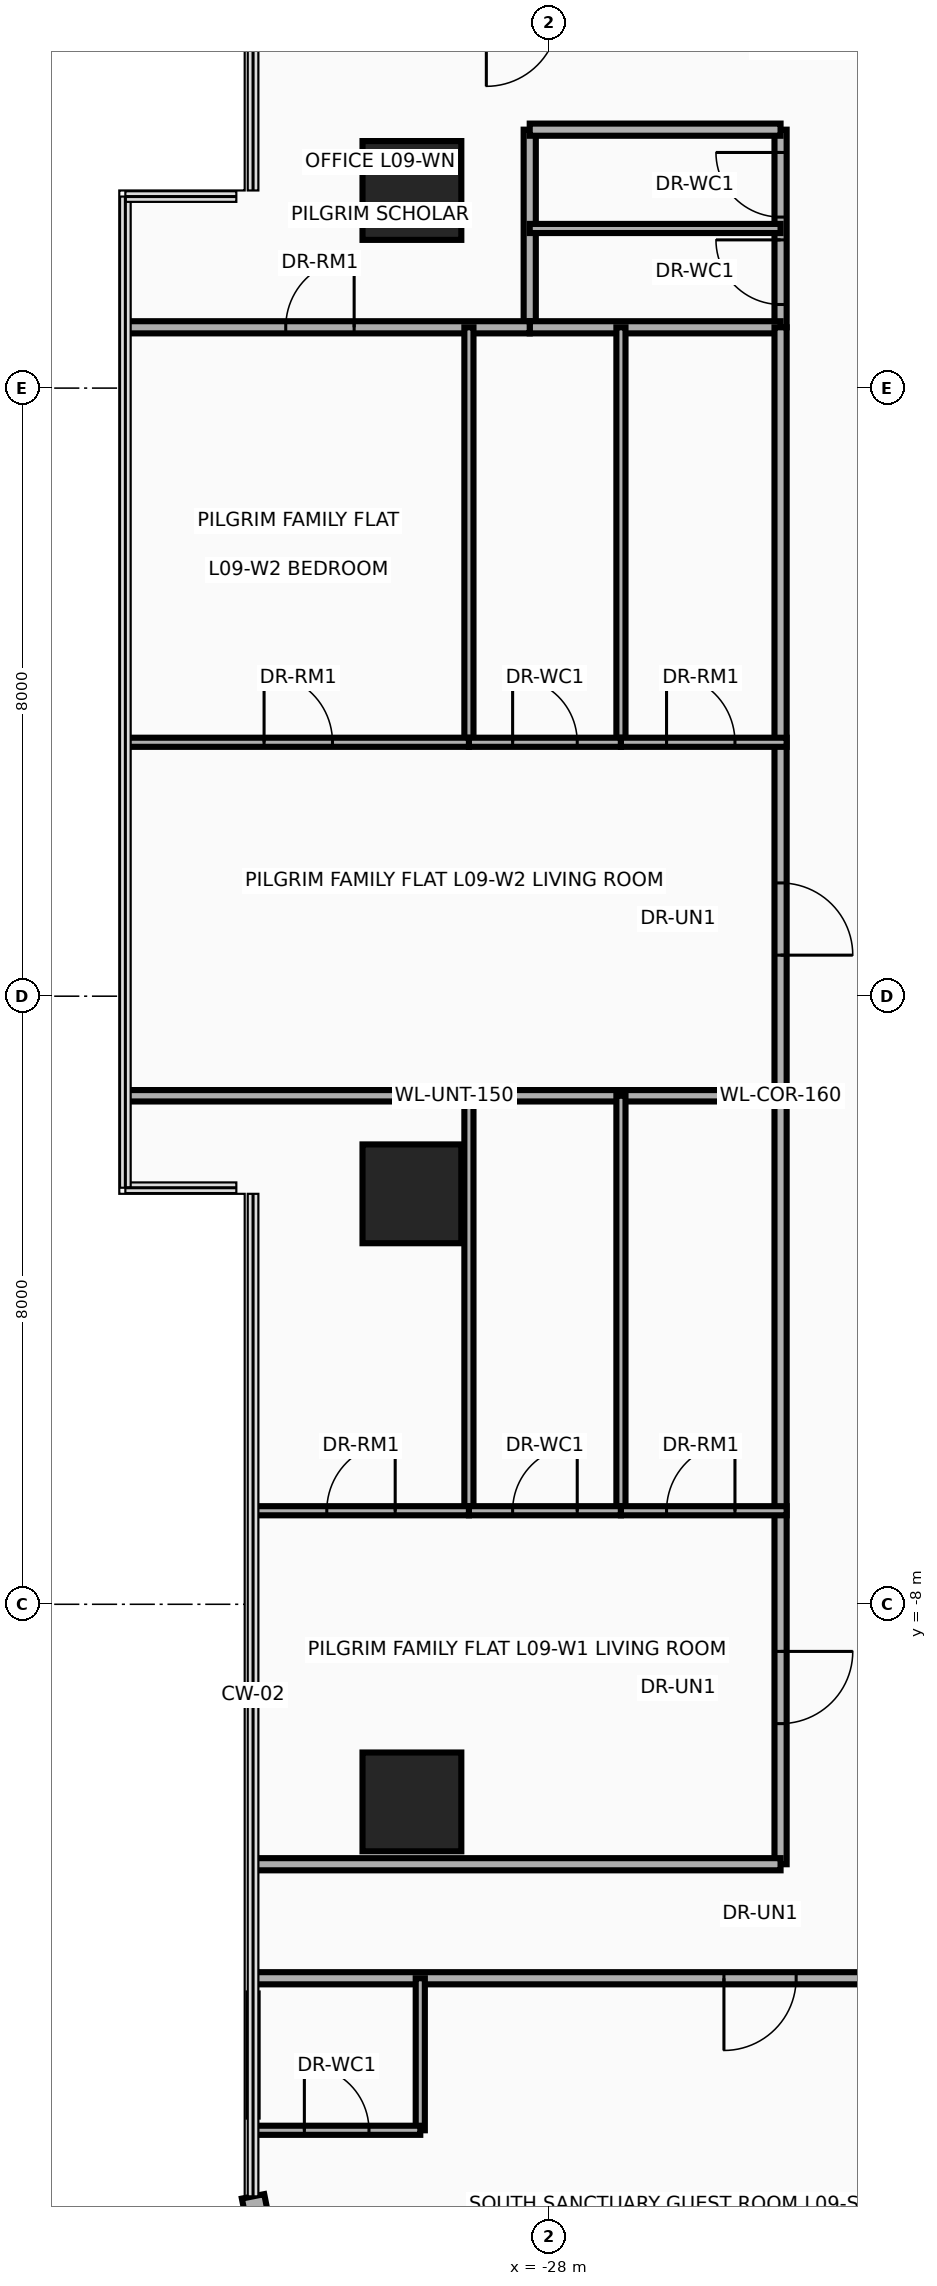
"""IFC4 building model, lengths in metres.
Left out: names, types, materials, properties, quantities, classifications, styles, units other than length and angle.
Written with IfcOpenShell. Run it as: python <this file> out.ifc"""

import sys

from ifc_helpers import new_model, si_unit, direction, frame, frame_2d, origin, origin_2d, place, context, subcontext, project, spatial, rectangle, circle, extrude, source, transform, mapped, element, fill, save


model = new_model("IFC4")
c1 = context("Model", 3, precision=1e-05, world=origin(), true_north=direction((0.0, 1.0)))
c2 = subcontext(c1, "Body", "Model", "MODEL_VIEW")
j1 = project(units=[si_unit("LENGTHUNIT", "METRE"), si_unit("PLANEANGLEUNIT", "RADIAN")], contexts=[c1])
p1 = place(None, origin())
s1 = spatial("IfcSite", under=j1, at=p1, CompositionType="ELEMENT")
p2 = place(p1, origin())
s2 = spatial("IfcBuilding", under=s1, at=p2, CompositionType="ELEMENT")
p3 = place(p2, frame((0.0, 0.0, 40.8)))
s3 = spatial("IfcBuildingStorey", under=s2, at=p3, CompositionType="ELEMENT", Elevation=40.8)
m1 = source(origin(), c2, "Body", "SweptSolid", [
    extrude(circle(Radius=0.65, at=origin_2d()), origin(), (0.0, 0.0, 1.0), 3.7),
])
for number, where, z_axis, x_axis in (
    (1, (-29.8, -10.6, 0.0), (0.0, 0.0, 1.0), (1.0, 0.0, 0.0)),
    (2, (-29.8, -2.6, 0.0), (0.0, 0.0, 1.0), (1.0, 0.0, 0.0)),
    (3, (-29.8, 10.6, 0.0), (0.0, 0.0, 1.0), (1.0, 0.0, 0.0)),
):
    element("IfcColumn", number, at=place(p3, frame(where, z_axis=z_axis, x_axis=x_axis)), inside=s3, PredefinedType="COLUMN", context=c2, shape_type="MappedRepresentation", body=[
        mapped(m1, transform((0.0, 0.0, 0.0), x_axis=(1.0, 0.0, 0.0), y_axis=(0.0, 1.0, 0.0), z_axis=(0.0, 0.0, 1.0), scale=1.0)),
    ])
p4 = place(p3, frame((-31.653, -16.982, 0.0), z_axis=(0.0, 0.0, 1.0), x_axis=(-0.194996050505, 0.980804027463, 0.0)))
e4 = element("IfcWall", 4, at=p4, inside=s3, PredefinedType="SOLIDWALL", context=c2, shape_type="SweptSolid", body=[
    extrude(rectangle(XDim=1.216, YDim=0.3, at=frame_2d((0.608, 0.0))), origin(), (0.0, 0.0, 1.0), 3.46),
])
p5 = place(p3, frame((-28.25, 8.8, 0.0), z_axis=(0.0, 0.0, 1.0), x_axis=(0.0, 1.0, 0.0)))
e5 = element("IfcWall", 5, at=p5, inside=s3, PredefinedType="PARTITIONING", context=c2, shape_type="SweptSolid", body=[
    extrude(rectangle(XDim=2.6, YDim=0.16, at=frame_2d((1.3, 0.0))), origin(), (0.0, 0.0, 1.0), 2.583),
])
p6 = place(p3, frame((-24.95, 8.8, 0.0), z_axis=(0.0, 0.0, 1.0), x_axis=(0.0, 1.0, 0.0)))
e6 = element("IfcWall", 6, at=p6, inside=s3, PredefinedType="PARTITIONING", context=c2, shape_type="SweptSolid", body=[
    extrude(rectangle(XDim=2.6, YDim=0.16, at=frame_2d((1.3, 0.0))), origin(), (0.0, 0.0, 1.0), 2.583),
])
p7 = place(p6, frame((0.3, 0.0, 0.0)))
e7 = element("IfcOpeningElement", 7, at=p7, cuts=e6, PredefinedType="OPENING", context=c2, shape_type="SweptSolid", body=[
    extrude(rectangle(XDim=0.85, YDim=2.1, at=frame_2d((0.425, 1.05))), frame((0.0, 0.095, 0.0), z_axis=(0.0, -1.0, 0.0), x_axis=(1.0, 0.0, 0.0)), (0.0, 0.0, 1.0), 0.19),
])
p8 = place(p6, frame((1.45, 0.0, 0.0)))
e8 = element("IfcOpeningElement", 8, at=p8, cuts=e6, PredefinedType="OPENING", context=c2, shape_type="SweptSolid", body=[
    extrude(rectangle(XDim=0.85, YDim=2.1, at=frame_2d((0.425, 1.05))), frame((0.0, 0.095, 0.0), z_axis=(0.0, -1.0, 0.0), x_axis=(1.0, 0.0, 0.0)), (0.0, 0.0, 1.0), 0.19),
])
for number, where, z_axis, x_axis in (
    (9, (-28.25, 8.8, 0.0), (0.0, 0.0, 1.0), (1.0, 0.0, 0.0)),
    (10, (-28.25, 11.4, 0.0), (0.0, 0.0, 1.0), (1.0, 0.0, 0.0)),
):
    element("IfcWall", number, at=place(p3, frame(where, z_axis=z_axis, x_axis=x_axis)), inside=s3, PredefinedType="PARTITIONING", context=c2, shape_type="SweptSolid", body=[
        extrude(rectangle(XDim=3.3, YDim=0.16, at=frame_2d((1.65, 0.0))), origin(), (0.0, 0.0, 1.0), 3.46),
    ])
p9 = place(p3, frame((-28.25, 10.1, 0.0), z_axis=(0.0, 0.0, 1.0), x_axis=(1.0, 0.0, 0.0)))
e11 = element("IfcWall", 11, at=p9, inside=s3, PredefinedType="PARTITIONING", context=c2, shape_type="SweptSolid", body=[
    extrude(rectangle(XDim=3.3, YDim=0.12, at=frame_2d((1.65, 0.0))), origin(), (0.0, 0.0, 1.0), 3.46),
])
p10 = place(p3, frame((-24.95, -11.42, 0.0), z_axis=(0.0, 0.0, 1.0), x_axis=(0.0, 1.0, 0.0)))
e12 = element("IfcWall", 12, at=p10, inside=s3, PredefinedType="PARTITIONING", context=c2, shape_type="SweptSolid", body=[
    extrude(rectangle(XDim=20.22, YDim=0.16, at=frame_2d((10.11, 0.0))), origin(), (0.0, 0.0, 1.0), 2.583),
])
p11 = place(p10, frame((1.85, 0.0, 0.0)))
e13 = element("IfcOpeningElement", 13, at=p11, cuts=e12, PredefinedType="OPENING", context=c2, shape_type="SweptSolid", body=[
    extrude(rectangle(XDim=0.95, YDim=2.15, at=frame_2d((0.475, 1.075))), frame((0.0, 0.095, 0.0), z_axis=(0.0, -1.0, 0.0), x_axis=(1.0, 0.0, 0.0)), (0.0, 0.0, 1.0), 0.19),
])
p12 = place(p10, frame((11.96, 0.0, 0.0)))
e14 = element("IfcOpeningElement", 14, at=p12, cuts=e12, PredefinedType="OPENING", context=c2, shape_type="SweptSolid", body=[
    extrude(rectangle(XDim=0.95, YDim=2.15, at=frame_2d((0.475, 1.075))), frame((0.0, 0.095, 0.0), z_axis=(0.0, -1.0, 0.0), x_axis=(1.0, 0.0, 0.0)), (0.0, 0.0, 1.0), 0.19),
])
p13 = place(p3, frame((-33.54, 8.8, 0.0), z_axis=(0.0, 0.0, 1.0), x_axis=(1.0, 0.0, 0.0)))
e15 = element("IfcWall", 15, at=p13, inside=s3, PredefinedType="PARTITIONING", context=c2, shape_type="SweptSolid", body=[
    extrude(rectangle(XDim=5.29, YDim=0.16, at=frame_2d((2.645, 0.0))), origin(), (0.0, 0.0, 1.0), 2.896),
])
p14 = place(p13, frame((2.08, 0.0, 0.0)))
e16 = element("IfcOpeningElement", 16, at=p14, cuts=e15, PredefinedType="OPENING", context=c2, shape_type="SweptSolid", body=[
    extrude(rectangle(XDim=0.9, YDim=2.1, at=frame_2d((0.45, 1.05))), frame((0.0, 0.095, 0.0), z_axis=(0.0, -1.0, 0.0), x_axis=(1.0, 0.0, 0.0)), (0.0, 0.0, 1.0), 0.19),
])
p15 = place(p3, frame((-33.54, -1.31, 0.0), z_axis=(0.0, 0.0, 1.0), x_axis=(1.0, 0.0, 0.0)))
e17 = element("IfcWall", 17, at=p15, inside=s3, PredefinedType="PARTITIONING", context=c2, shape_type="SweptSolid", body=[
    extrude(rectangle(XDim=8.59, YDim=0.15, at=frame_2d((4.295, 0.0))), origin(), (0.0, 0.0, 1.0), 2.896),
])
for number, where, z_axis, x_axis in (
    (18, (-27.05, -6.769, 0.0), (0.0, 0.0, 1.0), (0.0, 1.0, 0.0)),
    (19, (-29.05, -6.769, 0.0), (0.0, 0.0, 1.0), (0.0, 1.0, 0.0)),
):
    element("IfcWall", number, at=place(p3, frame(where, z_axis=z_axis, x_axis=x_axis)), inside=s3, PredefinedType="PARTITIONING", context=c2, shape_type="SweptSolid", body=[
        extrude(rectangle(XDim=5.459, YDim=0.12, at=frame_2d((2.729, 0.0))), origin(), (0.0, 0.0, 1.0), 2.583),
    ])
p16 = place(p3, frame((-29.05, -6.769, 0.0), z_axis=(0.0, 0.0, 1.0), x_axis=(1.0, 0.0, 0.0)))
e20 = element("IfcWall", 20, at=p16, inside=s3, PredefinedType="PARTITIONING", context=c2, shape_type="SweptSolid", body=[
    extrude(rectangle(XDim=2.0, YDim=0.12, at=frame_2d((1.0, 0.0))), origin(), (0.0, 0.0, 1.0), 2.979),
])
p17 = place(p16, frame((0.575, 0.0, 0.0)))
e21 = element("IfcOpeningElement", 21, at=p17, cuts=e20, PredefinedType="OPENING", context=c2, shape_type="SweptSolid", body=[
    extrude(rectangle(XDim=0.85, YDim=2.1, at=frame_2d((0.425, 1.05))), frame((0.0, 0.075, 0.0), z_axis=(0.0, -1.0, 0.0), x_axis=(1.0, 0.0, 0.0)), (0.0, 0.0, 1.0), 0.15),
])
p18 = place(p3, frame((-27.05, -6.769, 0.0), z_axis=(0.0, 0.0, 1.0), x_axis=(1.0, 0.0, 0.0)))
e22 = element("IfcWall", 22, at=p18, inside=s3, PredefinedType="PARTITIONING", context=c2, shape_type="SweptSolid", body=[
    extrude(rectangle(XDim=2.18, YDim=0.12, at=frame_2d((1.09, 0.0))), origin(), (0.0, 0.0, 1.0), 2.979),
])
p19 = place(p18, frame((0.6, 0.0, 0.0)))
e23 = element("IfcOpeningElement", 23, at=p19, cuts=e22, PredefinedType="OPENING", context=c2, shape_type="SweptSolid", body=[
    extrude(rectangle(XDim=0.9, YDim=2.1, at=frame_2d((0.45, 1.05))), frame((0.0, 0.075, 0.0), z_axis=(0.0, -1.0, 0.0), x_axis=(1.0, 0.0, 0.0)), (0.0, 0.0, 1.0), 0.15),
])
p20 = place(p3, frame((-31.89, -6.769, 0.0), z_axis=(0.0, 0.0, 1.0), x_axis=(1.0, 0.0, 0.0)))
e24 = element("IfcWall", 24, at=p20, inside=s3, PredefinedType="PARTITIONING", context=c2, shape_type="SweptSolid", body=[
    extrude(rectangle(XDim=2.84, YDim=0.12, at=frame_2d((1.42, 0.0))), origin(), (0.0, 0.0, 1.0), 2.896),
])
p21 = place(p20, frame((0.97, 0.0, 0.0)))
e25 = element("IfcOpeningElement", 25, at=p21, cuts=e24, PredefinedType="OPENING", context=c2, shape_type="SweptSolid", body=[
    extrude(rectangle(XDim=0.9, YDim=2.1, at=frame_2d((0.45, 1.05))), frame((0.0, 0.075, 0.0), z_axis=(0.0, -1.0, 0.0), x_axis=(1.0, 0.0, 0.0)), (0.0, 0.0, 1.0), 0.15),
])
for number, where, z_axis, x_axis in (
    (26, (-27.05, 3.341, 0.0), (0.0, 0.0, 1.0), (0.0, 1.0, 0.0)),
    (27, (-29.05, 3.341, 0.0), (0.0, 0.0, 1.0), (0.0, 1.0, 0.0)),
):
    element("IfcWall", number, at=place(p3, frame(where, z_axis=z_axis, x_axis=x_axis)), inside=s3, PredefinedType="PARTITIONING", context=c2, shape_type="SweptSolid", body=[
        extrude(rectangle(XDim=5.459, YDim=0.12, at=frame_2d((2.73, 0.0))), origin(), (0.0, 0.0, 1.0), 2.979),
    ])
p22 = place(p3, frame((-29.05, 3.341, 0.0), z_axis=(0.0, 0.0, 1.0), x_axis=(1.0, 0.0, 0.0)))
e28 = element("IfcWall", 28, at=p22, inside=s3, PredefinedType="PARTITIONING", context=c2, shape_type="SweptSolid", body=[
    extrude(rectangle(XDim=2.0, YDim=0.12, at=frame_2d((1.0, 0.0))), origin(), (0.0, 0.0, 1.0), 2.979),
])
p23 = place(p22, frame((0.575, 0.0, 0.0)))
e29 = element("IfcOpeningElement", 29, at=p23, cuts=e28, PredefinedType="OPENING", context=c2, shape_type="SweptSolid", body=[
    extrude(rectangle(XDim=0.85, YDim=2.1, at=frame_2d((0.425, 1.05))), frame((0.0, 0.075, 0.0), z_axis=(0.0, -1.0, 0.0), x_axis=(1.0, 0.0, 0.0)), (0.0, 0.0, 1.0), 0.15),
])
p24 = place(p3, frame((-27.05, 3.341, 0.0), z_axis=(0.0, 0.0, 1.0), x_axis=(1.0, 0.0, 0.0)))
e30 = element("IfcWall", 30, at=p24, inside=s3, PredefinedType="PARTITIONING", context=c2, shape_type="SweptSolid", body=[
    extrude(rectangle(XDim=2.18, YDim=0.12, at=frame_2d((1.09, 0.0))), origin(), (0.0, 0.0, 1.0), 2.979),
])
p25 = place(p24, frame((0.6, 0.0, 0.0)))
e31 = element("IfcOpeningElement", 31, at=p25, cuts=e30, PredefinedType="OPENING", context=c2, shape_type="SweptSolid", body=[
    extrude(rectangle(XDim=0.9, YDim=2.1, at=frame_2d((0.45, 1.05))), frame((0.0, 0.075, 0.0), z_axis=(0.0, -1.0, 0.0), x_axis=(1.0, 0.0, 0.0)), (0.0, 0.0, 1.0), 0.15),
])
p26 = place(p3, frame((-33.54, 3.341, 0.0), z_axis=(0.0, 0.0, 1.0), x_axis=(1.0, 0.0, 0.0)))
e32 = element("IfcWall", 32, at=p26, inside=s3, PredefinedType="PARTITIONING", context=c2, shape_type="SweptSolid", body=[
    extrude(rectangle(XDim=4.49, YDim=0.12, at=frame_2d((2.245, 0.0))), origin(), (0.0, 0.0, 1.0), 2.896),
])
p27 = place(p26, frame((1.795, 0.0, 0.0)))
e33 = element("IfcOpeningElement", 33, at=p27, cuts=e32, PredefinedType="OPENING", context=c2, shape_type="SweptSolid", body=[
    extrude(rectangle(XDim=0.9, YDim=2.1, at=frame_2d((0.45, 1.05))), frame((0.0, 0.075, 0.0), z_axis=(0.0, -1.0, 0.0), x_axis=(1.0, 0.0, 0.0)), (0.0, 0.0, 1.0), 0.15),
])
p28 = place(p3, frame((-31.89, -12.92, 0.0), z_axis=(0.0, 0.0, 1.0), x_axis=(1.0, 0.0, 0.0)))
e34 = element("IfcWall", 34, at=p28, inside=s3, PredefinedType="PARTITIONING", context=c2, shape_type="SweptSolid", body=[
    extrude(rectangle(XDim=22.28, YDim=0.16, at=frame_2d((11.14, 0.0))), origin(), (0.0, 0.0, 1.0), 2.834),
])
p29 = place(p28, frame((6.195, 0.0, 0.0)))
e35 = element("IfcOpeningElement", 35, at=p29, cuts=e34, PredefinedType="OPENING", context=c2, shape_type="SweptSolid", body=[
    extrude(rectangle(XDim=0.95, YDim=2.15, at=frame_2d((0.475, 1.075))), frame((0.0, 0.095, 0.0), z_axis=(0.0, -1.0, 0.0), x_axis=(1.0, 0.0, 0.0)), (0.0, 0.0, 1.0), 0.19),
])
p30 = place(p28, frame((17.335, 0.0, 0.0)))
e36 = element("IfcOpeningElement", 36, at=p30, cuts=e34, PredefinedType="OPENING", context=c2, shape_type="SweptSolid", body=[
    extrude(rectangle(XDim=0.95, YDim=2.15, at=frame_2d((0.475, 1.075))), frame((0.0, 0.095, 0.0), z_axis=(0.0, -1.0, 0.0), x_axis=(1.0, 0.0, 0.0)), (0.0, 0.0, 1.0), 0.19),
])
p31 = place(p3, frame((-29.69, -14.92, 0.0), z_axis=(0.0, 0.0, 1.0), x_axis=(0.0, 1.0, 0.0)))
e37 = element("IfcWall", 37, at=p31, inside=s3, PredefinedType="PARTITIONING", context=c2, shape_type="SweptSolid", body=[
    extrude(rectangle(XDim=2.0, YDim=0.12, at=frame_2d((1.0, 0.0))), origin(), (0.0, 0.0, 1.0), 3.46),
])
p32 = place(p3, frame((-31.89, -14.92, 0.0), z_axis=(0.0, 0.0, 1.0), x_axis=(1.0, 0.0, 0.0)))
e38 = element("IfcWall", 38, at=p32, inside=s3, PredefinedType="PARTITIONING", context=c2, shape_type="SweptSolid", body=[
    extrude(rectangle(XDim=2.2, YDim=0.12, at=frame_2d((1.1, 0.0))), origin(), (0.0, 0.0, 1.0), 3.46),
])
p33 = place(p32, frame((0.675, 0.0, 0.0)))
e39 = element("IfcOpeningElement", 39, at=p33, cuts=e38, PredefinedType="OPENING", context=c2, shape_type="SweptSolid", body=[
    extrude(rectangle(XDim=0.85, YDim=2.1, at=frame_2d((0.425, 1.05))), frame((0.0, 0.075, 0.0), z_axis=(0.0, -1.0, 0.0), x_axis=(1.0, 0.0, 0.0)), (0.0, 0.0, 1.0), 0.15),
])
p34 = place(p3, frame((-31.89, -14.74, 0.0), z_axis=(0.0, 0.0, 1.0), x_axis=(0.0, 1.0, 0.0)))
e40 = element("IfcWall", 40, at=p34, inside=s3, PredefinedType="PARTITIONING", context=c2, shape_type="SweptSolid", body=[
    extrude(rectangle(XDim=1.62, YDim=0.12, at=frame_2d((0.81, 0.0))), origin(), (0.0, 0.0, 1.0), 3.46),
])
p35 = place(p3, frame((-31.89, -11.42, 0.0), z_axis=(0.0, 0.0, 1.0), x_axis=(1.0, 0.0, 0.0)))
e41 = element("IfcWall", 41, at=p35, inside=s3, PredefinedType="PARTITIONING", context=c2, shape_type="SweptSolid", body=[
    extrude(rectangle(XDim=6.94, YDim=0.16, at=frame_2d((3.47, 0.0))), origin(), (0.0, 0.0, 1.0), 3.46),
])
p36 = place(p7, origin())
e42 = element("IfcDoor", 42, at=p36, inside=s3, OperationType="SINGLE_SWING_RIGHT", PredefinedType="DOOR", context=c2, shape_type="SweptSolid", body=[
    extrude(rectangle(XDim=0.85, YDim=2.1, at=frame_2d((0.425, 1.05))), frame((0.0, 0.025, 0.0), z_axis=(0.0, -1.0, 0.0), x_axis=(1.0, 0.0, 0.0)), (0.0, 0.0, 1.0), 0.05),
])
fill(e7, e42)
p37 = place(p8, origin())
e43 = element("IfcDoor", 43, at=p37, inside=s3, OperationType="SINGLE_SWING_LEFT", PredefinedType="DOOR", context=c2, shape_type="SweptSolid", body=[
    extrude(rectangle(XDim=0.85, YDim=2.1, at=frame_2d((0.425, 1.05))), frame((0.0, 0.025, 0.0), z_axis=(0.0, -1.0, 0.0), x_axis=(1.0, 0.0, 0.0)), (0.0, 0.0, 1.0), 0.05),
])
fill(e8, e43)
p38 = place(p14, origin())
e44 = element("IfcDoor", 44, at=p38, inside=s3, OperationType="SINGLE_SWING_RIGHT", PredefinedType="DOOR", context=c2, shape_type="SweptSolid", body=[
    extrude(rectangle(XDim=0.9, YDim=2.1, at=frame_2d((0.45, 1.05))), frame((0.0, 0.025, 0.0), z_axis=(0.0, -1.0, 0.0), x_axis=(1.0, 0.0, 0.0)), (0.0, 0.0, 1.0), 0.05),
])
fill(e16, e44)
p39 = place(p11, frame((0.95, 0.0, 0.0), z_axis=(0.0, 0.0, 1.0), x_axis=(-1.0, 0.0, 0.0)))
e45 = element("IfcDoor", 45, at=p39, inside=s3, OperationType="SINGLE_SWING_LEFT", PredefinedType="DOOR", context=c2, shape_type="SweptSolid", body=[
    extrude(rectangle(XDim=0.95, YDim=2.15, at=frame_2d((0.475, 1.075))), frame((0.0, 0.025, 0.0), z_axis=(0.0, -1.0, 0.0), x_axis=(1.0, 0.0, 0.0)), (0.0, 0.0, 1.0), 0.05),
])
fill(e13, e45)
p40 = place(p17, origin())
e46 = element("IfcDoor", 46, at=p40, inside=s3, OperationType="SINGLE_SWING_RIGHT", PredefinedType="DOOR", context=c2, shape_type="SweptSolid", body=[
    extrude(rectangle(XDim=0.85, YDim=2.1, at=frame_2d((0.425, 1.05))), frame((0.0, 0.025, 0.0), z_axis=(0.0, -1.0, 0.0), x_axis=(1.0, 0.0, 0.0)), (0.0, 0.0, 1.0), 0.05),
])
fill(e21, e46)
p41 = place(p19, origin())
e47 = element("IfcDoor", 47, at=p41, inside=s3, OperationType="SINGLE_SWING_LEFT", PredefinedType="DOOR", context=c2, shape_type="SweptSolid", body=[
    extrude(rectangle(XDim=0.9, YDim=2.1, at=frame_2d((0.45, 1.05))), frame((0.0, 0.025, 0.0), z_axis=(0.0, -1.0, 0.0), x_axis=(1.0, 0.0, 0.0)), (0.0, 0.0, 1.0), 0.05),
])
fill(e23, e47)
p42 = place(p21, origin())
e48 = element("IfcDoor", 48, at=p42, inside=s3, OperationType="SINGLE_SWING_RIGHT", PredefinedType="DOOR", context=c2, shape_type="SweptSolid", body=[
    extrude(rectangle(XDim=0.9, YDim=2.1, at=frame_2d((0.45, 1.05))), frame((0.0, 0.025, 0.0), z_axis=(0.0, -1.0, 0.0), x_axis=(1.0, 0.0, 0.0)), (0.0, 0.0, 1.0), 0.05),
])
fill(e25, e48)
p43 = place(p12, frame((0.95, 0.0, 0.0), z_axis=(0.0, 0.0, 1.0), x_axis=(-1.0, 0.0, 0.0)))
e49 = element("IfcDoor", 49, at=p43, inside=s3, OperationType="SINGLE_SWING_LEFT", PredefinedType="DOOR", context=c2, shape_type="SweptSolid", body=[
    extrude(rectangle(XDim=0.95, YDim=2.15, at=frame_2d((0.475, 1.075))), frame((0.0, 0.025, 0.0), z_axis=(0.0, -1.0, 0.0), x_axis=(1.0, 0.0, 0.0)), (0.0, 0.0, 1.0), 0.05),
])
fill(e14, e49)
p44 = place(p23, origin())
e50 = element("IfcDoor", 50, at=p44, inside=s3, OperationType="SINGLE_SWING_RIGHT", PredefinedType="DOOR", context=c2, shape_type="SweptSolid", body=[
    extrude(rectangle(XDim=0.85, YDim=2.1, at=frame_2d((0.425, 1.05))), frame((0.0, 0.025, 0.0), z_axis=(0.0, -1.0, 0.0), x_axis=(1.0, 0.0, 0.0)), (0.0, 0.0, 1.0), 0.05),
])
fill(e29, e50)
p45 = place(p25, origin())
e51 = element("IfcDoor", 51, at=p45, inside=s3, OperationType="SINGLE_SWING_LEFT", PredefinedType="DOOR", context=c2, shape_type="SweptSolid", body=[
    extrude(rectangle(XDim=0.9, YDim=2.1, at=frame_2d((0.45, 1.05))), frame((0.0, 0.025, 0.0), z_axis=(0.0, -1.0, 0.0), x_axis=(1.0, 0.0, 0.0)), (0.0, 0.0, 1.0), 0.05),
])
fill(e31, e51)
p46 = place(p27, origin())
e52 = element("IfcDoor", 52, at=p46, inside=s3, OperationType="SINGLE_SWING_RIGHT", PredefinedType="DOOR", context=c2, shape_type="SweptSolid", body=[
    extrude(rectangle(XDim=0.9, YDim=2.1, at=frame_2d((0.45, 1.05))), frame((0.0, 0.025, 0.0), z_axis=(0.0, -1.0, 0.0), x_axis=(1.0, 0.0, 0.0)), (0.0, 0.0, 1.0), 0.05),
])
fill(e33, e52)
p47 = place(p29, frame((0.95, 0.0, 0.0), z_axis=(0.0, 0.0, 1.0), x_axis=(-1.0, 0.0, 0.0)))
e53 = element("IfcDoor", 53, at=p47, inside=s3, OperationType="SINGLE_SWING_LEFT", PredefinedType="DOOR", context=c2, shape_type="SweptSolid", body=[
    extrude(rectangle(XDim=0.95, YDim=2.15, at=frame_2d((0.475, 1.075))), frame((0.0, 0.025, 0.0), z_axis=(0.0, -1.0, 0.0), x_axis=(1.0, 0.0, 0.0)), (0.0, 0.0, 1.0), 0.05),
])
fill(e35, e53)
p48 = place(p33, origin())
e54 = element("IfcDoor", 54, at=p48, inside=s3, OperationType="SINGLE_SWING_RIGHT", PredefinedType="DOOR", context=c2, shape_type="SweptSolid", body=[
    extrude(rectangle(XDim=0.85, YDim=2.1, at=frame_2d((0.425, 1.05))), frame((0.0, 0.025, 0.0), z_axis=(0.0, -1.0, 0.0), x_axis=(1.0, 0.0, 0.0)), (0.0, 0.0, 1.0), 0.05),
])
fill(e39, e54)
save(model, sys.argv[1])
